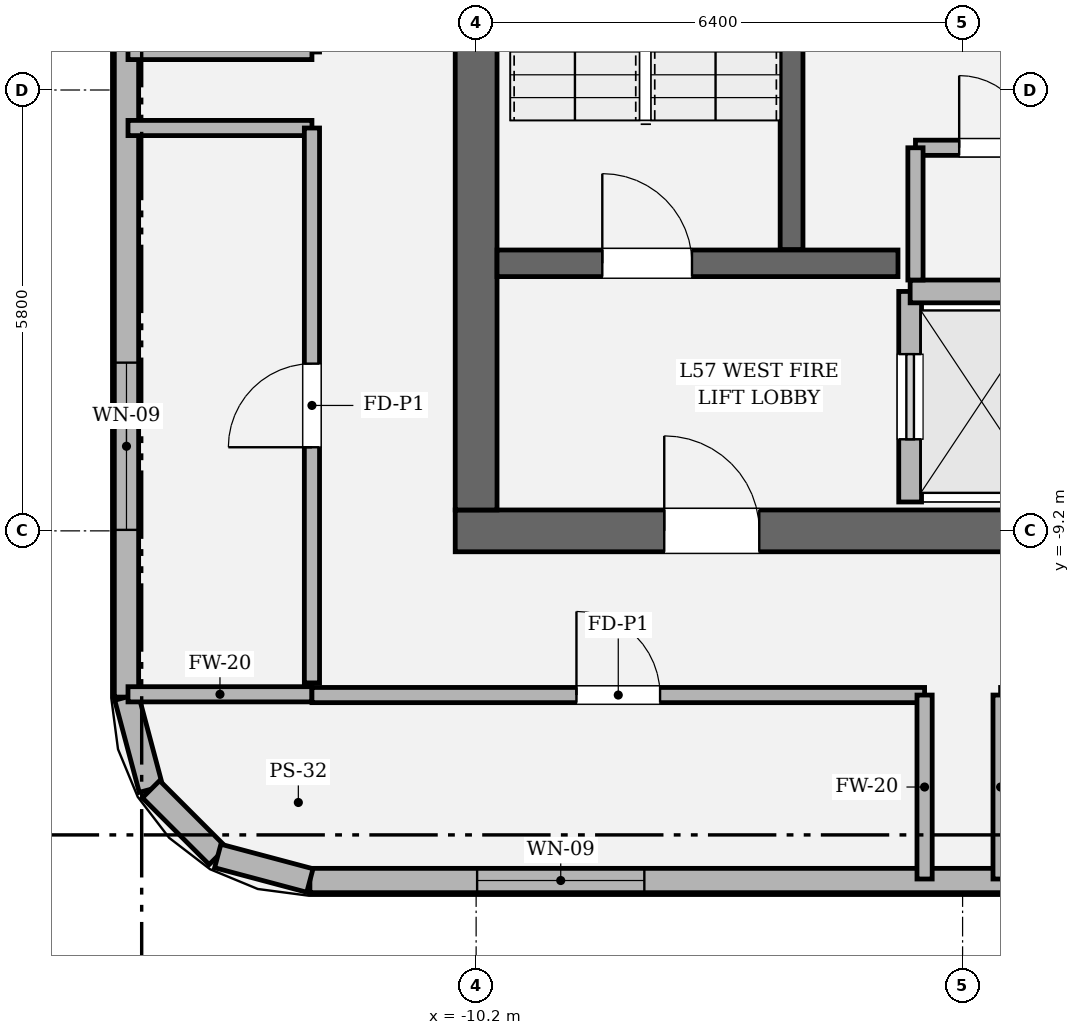
"""IFC4 building model, lengths in metres.
Left out: names, types, materials, properties, quantities, classifications, styles, units other than length and angle.
Written with IfcOpenShell. Run it as: python <this file> out.ifc"""

import sys

from ifc_helpers import new_model, si_unit, direction, frame, frame_2d, origin, place, context, subcontext, project, spatial, rectangle, extrude, element, fill, save


model = new_model("IFC4")
c1 = context("Model", 3, precision=1e-05, world=origin(), true_north=direction((0.0, 1.0)))
c2 = subcontext(c1, "Body", "Model", "MODEL_VIEW")
j1 = project(units=[si_unit("LENGTHUNIT", "METRE"), si_unit("PLANEANGLEUNIT", "RADIAN")], contexts=[c1])
p1 = place(None, origin())
s1 = spatial("IfcSite", under=j1, at=p1, CompositionType="ELEMENT")
p2 = place(p1, origin())
s2 = spatial("IfcBuilding", under=s1, at=p2, CompositionType="ELEMENT")
p3 = place(p2, frame((0.0, 0.0, 241.8)))
s3 = spatial("IfcBuildingStorey", under=s2, at=p3, CompositionType="ELEMENT", Elevation=241.8)
p4 = place(p3, frame((10.475, -9.2, 0.0), z_axis=(0.0, 0.0, 1.0), x_axis=(-1.0, 0.0, 0.0)))
e1 = element("IfcWall", 1, at=p4, inside=s3, PredefinedType="SHEAR", context=c2, shape_type="SweptSolid", body=[
    extrude(rectangle(XDim=20.95, YDim=0.55, at=frame_2d((10.475, 0.0))), origin(), (0.0, 0.0, 1.0), 4.8),
])
p5 = place(p4, frame((2.75, 0.0, 0.0)))
e2 = element("IfcOpeningElement", 2, at=p5, cuts=e1, PredefinedType="OPENING", context=c2, shape_type="SweptSolid", body=[
    extrude(rectangle(XDim=1.25, YDim=2.25, at=frame_2d((0.625, 1.125))), frame((0.0, 0.285, 0.0), z_axis=(0.0, -1.0, 0.0), x_axis=(1.0, 0.0, 0.0)), (0.0, 0.0, 1.0), 0.57),
])
p6 = place(p4, frame((16.95, 0.0, 0.0)))
e3 = element("IfcOpeningElement", 3, at=p6, cuts=e1, PredefinedType="OPENING", context=c2, shape_type="SweptSolid", body=[
    extrude(rectangle(XDim=1.25, YDim=2.25, at=frame_2d((0.625, 1.125))), frame((0.0, 0.285, 0.0), z_axis=(0.0, -1.0, 0.0), x_axis=(1.0, 0.0, 0.0)), (0.0, 0.0, 1.0), 0.57),
])
p7 = place(p3, frame((-10.2, -8.925, 0.0), z_axis=(0.0, 0.0, 1.0), x_axis=(0.0, 1.0, 0.0)))
e4 = element("IfcWall", 4, at=p7, inside=s3, PredefinedType="SHEAR", context=c2, shape_type="SweptSolid", body=[
    extrude(rectangle(XDim=17.85, YDim=0.55, at=frame_2d((8.925, 0.0))), origin(), (0.0, 0.0, 1.0), 4.8),
])
p8 = place(p7, frame((12.715, 0.0, 0.0)))
e5 = element("IfcOpeningElement", 5, at=p8, cuts=e4, PredefinedType="OPENING", context=c2, shape_type="SweptSolid", body=[
    extrude(rectangle(XDim=1.18, YDim=2.2, at=frame_2d((0.59, 1.1))), frame((0.0, 0.285, 0.0), z_axis=(0.0, -1.0, 0.0), x_axis=(1.0, 0.0, 0.0)), (0.0, 0.0, 1.0), 0.57),
])
p9 = place(p3, frame((-6.05, -5.5, 0.0), z_axis=(0.0, 0.0, 1.0), x_axis=(0.0, 1.0, 0.0)))
e6 = element("IfcWall", 6, at=p9, inside=s3, PredefinedType="SOLIDWALL", context=c2, shape_type="SweptSolid", body=[
    extrude(rectangle(XDim=8.95, YDim=0.3, at=frame_2d((4.475, 0.0))), origin(), (0.0, 0.0, 1.0), 4.8),
])
p10 = place(p3, frame((-9.925, -5.68, 0.0), z_axis=(0.0, 0.0, 1.0), x_axis=(1.0, 0.0, 0.0)))
e7 = element("IfcWall", 7, at=p10, inside=s3, PredefinedType="SOLIDWALL", context=c2, shape_type="SweptSolid", body=[
    extrude(rectangle(XDim=5.275, YDim=0.35, at=frame_2d((2.638, 0.0))), origin(), (0.0, 0.0, 1.0), 4.8),
])
p11 = place(p10, frame((1.385, 0.0, 0.0)))
e8 = element("IfcOpeningElement", 8, at=p11, cuts=e7, PredefinedType="OPENING", context=c2, shape_type="SweptSolid", body=[
    extrude(rectangle(XDim=1.18, YDim=2.2, at=frame_2d((0.59, 1.1))), frame((0.0, 0.185, 0.0), z_axis=(0.0, -1.0, 0.0), x_axis=(1.0, 0.0, 0.0)), (0.0, 0.0, 1.0), 0.37),
])
p12 = place(p3, frame((-12.387, -13.8, 0.0), z_axis=(0.0, 0.0, 1.0), x_axis=(1.0, 0.0, 0.0)))
e9 = element("IfcWall", 9, at=p12, inside=s3, PredefinedType="SOLIDWALL", context=c2, shape_type="SweptSolid", body=[
    extrude(rectangle(XDim=24.774, YDim=0.32, at=frame_2d((12.387, 0.0))), origin(), (0.0, 0.0, 1.0), 3.884),
])
p13 = place(p12, frame((2.2, 0.0, 0.9)))
e10 = element("IfcOpeningElement", 10, at=p13, cuts=e9, PredefinedType="OPENING", context=c2, shape_type="SweptSolid", body=[
    extrude(rectangle(XDim=2.2, YDim=1.2, at=frame_2d((1.1, 0.6))), frame((0.0, 0.17, 0.0), z_axis=(0.0, -1.0, 0.0), x_axis=(1.0, 0.0, 0.0)), (0.0, 0.0, 1.0), 0.34),
])
p14 = place(p12, frame((20.374, 0.0, 0.9)))
e11 = element("IfcOpeningElement", 11, at=p14, cuts=e9, PredefinedType="OPENING", context=c2, shape_type="SweptSolid", body=[
    extrude(rectangle(XDim=2.2, YDim=1.2, at=frame_2d((1.1, 0.6))), frame((0.0, 0.17, 0.0), z_axis=(0.0, -1.0, 0.0), x_axis=(1.0, 0.0, 0.0)), (0.0, 0.0, 1.0), 0.34),
])
p15 = place(p3, frame((-14.8, 11.387, 0.0), z_axis=(0.0, 0.0, 1.0), x_axis=(0.0, -1.0, 0.0)))
e12 = element("IfcWall", 12, at=p15, inside=s3, PredefinedType="SOLIDWALL", context=c2, shape_type="SweptSolid", body=[
    extrude(rectangle(XDim=22.774, YDim=0.32, at=frame_2d((11.387, 0.0))), origin(), (0.0, 0.0, 1.0), 3.884),
])
p16 = place(p15, frame((2.2, 0.0, 0.9)))
e13 = element("IfcOpeningElement", 13, at=p16, cuts=e12, PredefinedType="OPENING", context=c2, shape_type="SweptSolid", body=[
    extrude(rectangle(XDim=2.2, YDim=1.2, at=frame_2d((1.1, 0.6))), frame((0.0, 0.17, 0.0), z_axis=(0.0, -1.0, 0.0), x_axis=(1.0, 0.0, 0.0)), (0.0, 0.0, 1.0), 0.34),
])
p17 = place(p15, frame((18.374, 0.0, 0.9)))
e14 = element("IfcOpeningElement", 14, at=p17, cuts=e12, PredefinedType="OPENING", context=c2, shape_type="SweptSolid", body=[
    extrude(rectangle(XDim=2.2, YDim=1.2, at=frame_2d((1.1, 0.6))), frame((0.0, 0.17, 0.0), z_axis=(0.0, -1.0, 0.0), x_axis=(1.0, 0.0, 0.0)), (0.0, 0.0, 1.0), 0.34),
])
p18 = place(p3, frame((-14.8, -11.387, 0.0), z_axis=(0.0, 0.0, 1.0), x_axis=(0.25748094776, -0.966283375382, 0.0)))
e15 = element("IfcWall", 15, at=p18, inside=s3, PredefinedType="SOLIDWALL", context=c2, shape_type="SweptSolid", body=[
    extrude(rectangle(XDim=1.254, YDim=0.32, at=frame_2d((0.627, 0.0))), origin(), (0.0, 0.0, 1.0), 4.034),
])
p19 = place(p3, frame((-14.477, -12.599, 0.0), z_axis=(0.0, 0.0, 1.0), x_axis=(0.707106781187, -0.707106781187, 0.0)))
e16 = element("IfcWall", 16, at=p19, inside=s3, PredefinedType="SOLIDWALL", context=c2, shape_type="SweptSolid", body=[
    extrude(rectangle(XDim=1.242, YDim=0.32, at=frame_2d((0.621, 0.0))), origin(), (0.0, 0.0, 1.0), 4.034),
])
p20 = place(p3, frame((-13.599, -13.477, 0.0), z_axis=(0.0, 0.0, 1.0), x_axis=(0.966283375382, -0.25748094776, 0.0)))
e17 = element("IfcWall", 17, at=p20, inside=s3, PredefinedType="SOLIDWALL", context=c2, shape_type="SweptSolid", body=[
    extrude(rectangle(XDim=1.254, YDim=0.32, at=frame_2d((0.627, 0.0))), origin(), (0.0, 0.0, 1.0), 4.034),
])
p21 = place(p3, frame((-4.49, -8.82, 0.0), z_axis=(0.0, 0.0, 1.0), x_axis=(0.0, 1.0, 0.0)))
e18 = element("IfcWall", 18, at=p21, inside=s3, PredefinedType="SOLIDWALL", context=c2, shape_type="SweptSolid", body=[
    extrude(rectangle(XDim=2.77, YDim=0.3, at=frame_2d((1.385, 0.0))), origin(), (0.0, 0.0, 1.0), 4.54),
])
p22 = place(p21, frame((0.825, 0.0, 0.0)))
e19 = element("IfcOpeningElement", 19, at=p22, cuts=e18, PredefinedType="OPENING", context=c2, shape_type="SweptSolid", body=[
    extrude(rectangle(XDim=1.12, YDim=2.25, at=frame_2d((0.56, 1.125))), frame((0.0, 0.16, 0.0), z_axis=(0.0, -1.0, 0.0), x_axis=(1.0, 0.0, 0.0)), (0.0, 0.0, 1.0), 0.32),
])
p23 = place(p3, frame((-4.49, -6.05, 0.0), z_axis=(0.0, 0.0, 1.0), x_axis=(1.0, 0.0, 0.0)))
e20 = element("IfcWall", 20, at=p23, inside=s3, PredefinedType="SOLIDWALL", context=c2, shape_type="SweptSolid", body=[
    extrude(rectangle(XDim=1.88, YDim=0.3, at=frame_2d((0.94, 0.0))), origin(), (0.0, 0.0, 1.0), 4.54),
])
p24 = place(p3, frame((-2.32, -4.16, 0.0), z_axis=(0.0, 0.0, 1.0), x_axis=(-1.0, 0.0, 0.0)))
e21 = element("IfcWall", 21, at=p24, inside=s3, PredefinedType="SOLIDWALL", context=c2, shape_type="SweptSolid", body=[
    extrude(rectangle(XDim=2.1, YDim=0.2, at=frame_2d((1.05, 0.0))), origin(), (0.0, 0.0, 1.0), 4.54),
])
p25 = place(p24, frame((0.575, 0.0, 0.0)))
e22 = element("IfcOpeningElement", 22, at=p25, cuts=e21, PredefinedType="OPENING", context=c2, shape_type="SweptSolid", body=[
    extrude(rectangle(XDim=0.95, YDim=2.15, at=frame_2d((0.475, 1.075))), frame((0.0, 0.11, 0.0), z_axis=(0.0, -1.0, 0.0), x_axis=(1.0, 0.0, 0.0)), (0.0, 0.0, 1.0), 0.22),
])
p26 = place(p3, frame((-4.42, -4.16, 0.0), z_axis=(0.0, 0.0, 1.0), x_axis=(0.0, -1.0, 0.0)))
e23 = element("IfcWall", 23, at=p26, inside=s3, PredefinedType="SOLIDWALL", context=c2, shape_type="SweptSolid", body=[
    extrude(rectangle(XDim=1.74, YDim=0.2, at=frame_2d((0.87, 0.0))), origin(), (0.0, 0.0, 1.0), 4.54),
])
p27 = place(p3, frame((-14.78, -11.35, 0.0), z_axis=(0.0, 0.0, 1.0), x_axis=(1.0, 0.0, 0.0)))
e24 = element("IfcWall", 24, at=p27, inside=s3, PredefinedType="SOLIDWALL", context=c2, shape_type="SweptSolid", body=[
    extrude(rectangle(XDim=2.42, YDim=0.2, at=frame_2d((1.21, 0.0))), origin(), (0.0, 0.0, 1.0), 4.034),
])
p28 = place(p3, frame((-12.36, -11.36, 0.0), z_axis=(0.0, 0.0, 1.0), x_axis=(1.0, 0.0, 0.0)))
e25 = element("IfcWall", 25, at=p28, inside=s3, PredefinedType="SOLIDWALL", context=c2, shape_type="SweptSolid", body=[
    extrude(rectangle(XDim=8.06, YDim=0.2, at=frame_2d((4.03, 0.0))), origin(), (0.0, 0.0, 1.0), 4.54),
])
p29 = place(p28, frame((3.48, 0.0, 0.0)))
e26 = element("IfcOpeningElement", 26, at=p29, cuts=e25, PredefinedType="OPENING", context=c2, shape_type="SweptSolid", body=[
    extrude(rectangle(XDim=1.1, YDim=2.2, at=frame_2d((0.55, 1.1))), frame((0.0, 0.11, 0.0), z_axis=(0.0, -1.0, 0.0), x_axis=(1.0, 0.0, 0.0)), (0.0, 0.0, 1.0), 0.22),
])
for number, where, z_axis, x_axis in (
    (27, (-4.3, -11.36, 0.0), (0.0, 0.0, 1.0), (0.0, -1.0, 0.0)),
    (28, (-3.3, -13.78, 0.0), (0.0, 0.0, 1.0), (0.0, 1.0, 0.0)),
    (29, (-14.78, -3.9, 0.0), (0.0, 0.0, 1.0), (1.0, 0.0, 0.0)),
):
    element("IfcWall", number, at=place(p3, frame(where, z_axis=z_axis, x_axis=x_axis)), inside=s3, PredefinedType="SOLIDWALL", context=c2, shape_type="SweptSolid", body=[
        extrude(rectangle(XDim=2.42, YDim=0.2, at=frame_2d((1.21, 0.0))), origin(), (0.0, 0.0, 1.0), 4.034),
    ])
p30 = place(p3, frame((-12.36, -3.9, 0.0), z_axis=(0.0, 0.0, 1.0), x_axis=(0.0, -1.0, 0.0)))
e30 = element("IfcWall", 30, at=p30, inside=s3, PredefinedType="SOLIDWALL", context=c2, shape_type="SweptSolid", body=[
    extrude(rectangle(XDim=7.3, YDim=0.2, at=frame_2d((3.65, 0.0))), origin(), (0.0, 0.0, 1.0), 4.54),
])
p31 = place(p30, frame((3.1, 0.0, 0.0)))
e31 = element("IfcOpeningElement", 31, at=p31, cuts=e30, PredefinedType="OPENING", context=c2, shape_type="SweptSolid", body=[
    extrude(rectangle(XDim=1.1, YDim=2.2, at=frame_2d((0.55, 1.1))), frame((0.0, 0.11, 0.0), z_axis=(0.0, -1.0, 0.0), x_axis=(1.0, 0.0, 0.0)), (0.0, 0.0, 1.0), 0.22),
])
p32 = place(p3, frame((-12.36, -2.9, 0.0), z_axis=(0.0, 0.0, 1.0), x_axis=(-1.0, 0.0, 0.0)))
e32 = element("IfcWall", 32, at=p32, inside=s3, PredefinedType="SOLIDWALL", context=c2, shape_type="SweptSolid", body=[
    extrude(rectangle(XDim=2.42, YDim=0.2, at=frame_2d((1.21, 0.0))), origin(), (0.0, 0.0, 1.0), 4.034),
])
p33 = place(p13, origin())
e33 = element("IfcWindow", 33, at=p33, inside=s3, PartitioningType="SINGLE_PANEL", PredefinedType="WINDOW", context=c2, shape_type="SweptSolid", body=[
    extrude(rectangle(XDim=2.2, YDim=1.2, at=frame_2d((1.1, 0.6))), frame((0.0, 0.03, 0.0), z_axis=(0.0, -1.0, 0.0), x_axis=(1.0, 0.0, 0.0)), (0.0, 0.0, 1.0), 0.06),
])
fill(e10, e33)
p34 = place(p17, origin())
e34 = element("IfcWindow", 34, at=p34, inside=s3, PartitioningType="SINGLE_PANEL", PredefinedType="WINDOW", context=c2, shape_type="SweptSolid", body=[
    extrude(rectangle(XDim=2.2, YDim=1.2, at=frame_2d((1.1, 0.6))), frame((0.0, 0.03, 0.0), z_axis=(0.0, -1.0, 0.0), x_axis=(1.0, 0.0, 0.0)), (0.0, 0.0, 1.0), 0.06),
])
fill(e14, e34)
p35 = place(p11, origin())
e35 = element("IfcDoor", 35, at=p35, inside=s3, OperationType="SINGLE_SWING_LEFT", PredefinedType="DOOR", context=c2, shape_type="SweptSolid", body=[
    extrude(rectangle(XDim=1.18, YDim=2.2, at=frame_2d((0.59, 1.1))), frame((0.0, 0.025, 0.0), z_axis=(0.0, -1.0, 0.0), x_axis=(1.0, 0.0, 0.0)), (0.0, 0.0, 1.0), 0.05),
])
fill(e8, e35)
p36 = place(p6, origin())
e36 = element("IfcDoor", 36, at=p36, inside=s3, OperationType="SINGLE_SWING_RIGHT", PredefinedType="DOOR", context=c2, shape_type="SweptSolid", body=[
    extrude(rectangle(XDim=1.25, YDim=2.25, at=frame_2d((0.625, 1.125))), frame((0.0, 0.025, 0.0), z_axis=(0.0, -1.0, 0.0), x_axis=(1.0, 0.0, 0.0)), (0.0, 0.0, 1.0), 0.05),
])
fill(e3, e36)
p37 = place(p22, origin())
e37 = element("IfcDoor", 37, at=p37, inside=s3, OperationType="SLIDING_TO_LEFT", PredefinedType="DOOR", context=c2, shape_type="SweptSolid", body=[
    extrude(rectangle(XDim=1.12, YDim=2.25, at=frame_2d((0.56, 1.125))), frame((0.0, 0.025, 0.0), z_axis=(0.0, -1.0, 0.0), x_axis=(1.0, 0.0, 0.0)), (0.0, 0.0, 1.0), 0.05),
])
fill(e19, e37)
p38 = place(p25, origin())
e38 = element("IfcDoor", 38, at=p38, inside=s3, OperationType="SINGLE_SWING_RIGHT", PredefinedType="DOOR", context=c2, shape_type="SweptSolid", body=[
    extrude(rectangle(XDim=0.95, YDim=2.15, at=frame_2d((0.475, 1.075))), frame((0.0, 0.025, 0.0), z_axis=(0.0, -1.0, 0.0), x_axis=(1.0, 0.0, 0.0)), (0.0, 0.0, 1.0), 0.05),
])
fill(e22, e38)
p39 = place(p29, origin())
e39 = element("IfcDoor", 39, at=p39, inside=s3, OperationType="SINGLE_SWING_LEFT", PredefinedType="DOOR", context=c2, shape_type="SweptSolid", body=[
    extrude(rectangle(XDim=1.1, YDim=2.2, at=frame_2d((0.55, 1.1))), frame((0.0, 0.025, 0.0), z_axis=(0.0, -1.0, 0.0), x_axis=(1.0, 0.0, 0.0)), (0.0, 0.0, 1.0), 0.05),
])
fill(e26, e39)
p40 = place(p31, origin())
e40 = element("IfcDoor", 40, at=p40, inside=s3, OperationType="SINGLE_SWING_RIGHT", PredefinedType="DOOR", context=c2, shape_type="SweptSolid", body=[
    extrude(rectangle(XDim=1.1, YDim=2.2, at=frame_2d((0.55, 1.1))), frame((0.0, 0.025, 0.0), z_axis=(0.0, -1.0, 0.0), x_axis=(1.0, 0.0, 0.0)), (0.0, 0.0, 1.0), 0.05),
])
fill(e31, e40)
save(model, sys.argv[1])
